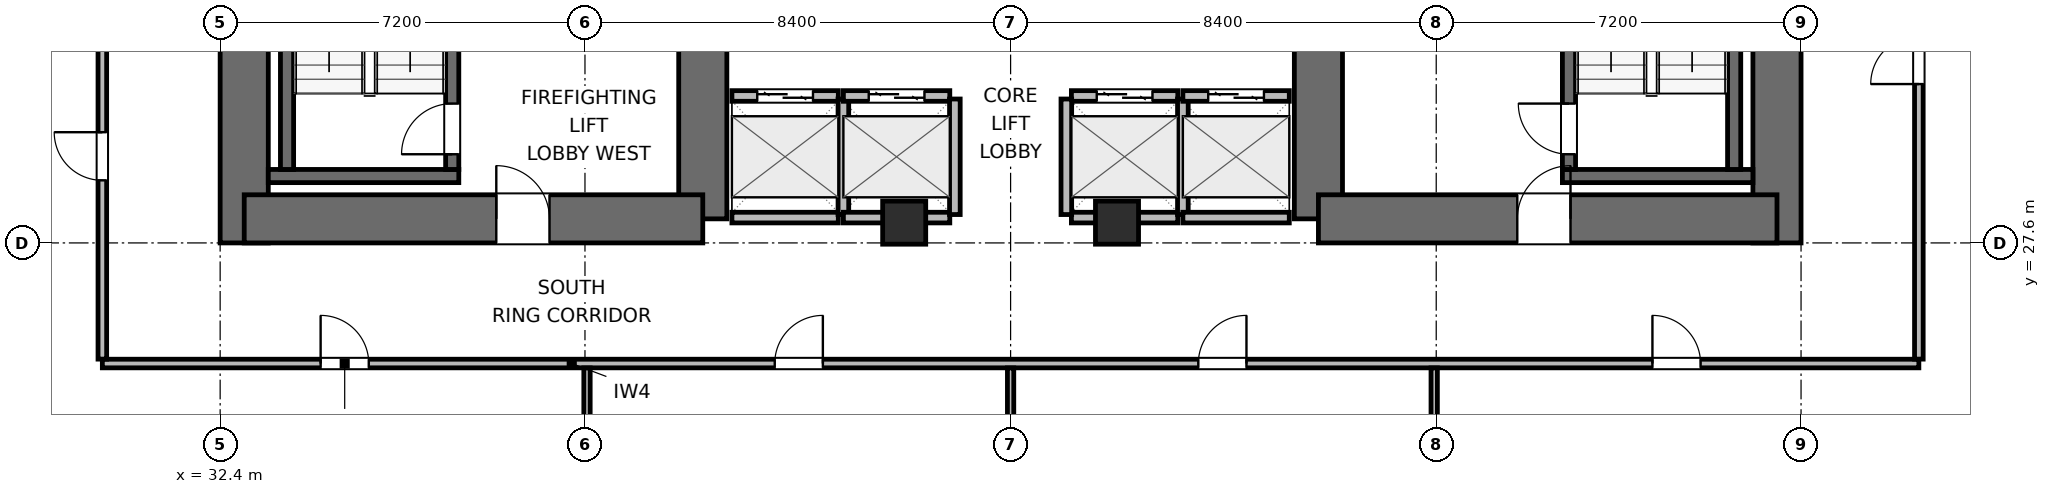
"""IFC4 building model, lengths in metres.
Left out: names, types, materials, properties, quantities, classifications, styles, units other than length and angle.
Written with IfcOpenShell. Run it as: python <this file> out.ifc"""

import sys

from ifc_helpers import new_model, si_unit, direction, frame, frame_2d, origin, origin_2d, place, context, subcontext, project, spatial, rectangle, extrude, element, fill, save


model = new_model("IFC4")
c1 = context("Model", 3, precision=1e-05, world=origin(), true_north=direction((0.0, 1.0)))
c2 = subcontext(c1, "Body", "Model", "MODEL_VIEW")
j1 = project(units=[si_unit("LENGTHUNIT", "METRE"), si_unit("PLANEANGLEUNIT", "RADIAN")], contexts=[c1])
p1 = place(None, origin())
s1 = spatial("IfcSite", under=j1, at=p1, CompositionType="ELEMENT")
p2 = place(p1, origin())
s2 = spatial("IfcBuilding", under=s1, at=p2, CompositionType="ELEMENT")
p3 = place(p2, frame((0.0, 0.0, 37.2)))
s3 = spatial("IfcBuildingStorey", under=s2, at=p3, CompositionType="ELEMENT", Elevation=37.2)
p4 = place(p3, frame((32.875, 27.6, 0.0), z_axis=(0.0, 0.0, 1.0), x_axis=(0.0, 1.0, 0.0)))
e1 = element("IfcWall", 1, at=p4, inside=s3, PredefinedType="SHEAR", context=c2, shape_type="SweptSolid", body=[
    extrude(rectangle(XDim=16.8, YDim=0.95, at=frame_2d((8.4, 0.0))), origin(), (0.0, 0.0, 1.0), 3.9),
])
p5 = place(p3, frame((41.925, 28.075, 0.0), z_axis=(0.0, 0.0, 1.0), x_axis=(0.0, 1.0, 0.0)))
e2 = element("IfcWall", 2, at=p5, inside=s3, PredefinedType="SHEAR", context=c2, shape_type="SweptSolid", body=[
    extrude(rectangle(XDim=6.325, YDim=0.95, at=frame_2d((3.163, 0.0))), origin(), (0.0, 0.0, 1.0), 3.9),
])
p6 = place(p3, frame((32.875, 28.075, 0.0), z_axis=(0.0, 0.0, 1.0), x_axis=(1.0, 0.0, 0.0)))
e3 = element("IfcWall", 3, at=p6, inside=s3, PredefinedType="SHEAR", context=c2, shape_type="SweptSolid", body=[
    extrude(rectangle(XDim=9.05, YDim=0.95, at=frame_2d((4.525, 0.0))), origin(), (0.0, 0.0, 1.0), 3.9),
])
p7 = place(p6, frame((4.975, 0.0, 0.0)))
e4 = element("IfcOpeningElement", 4, at=p7, cuts=e3, PredefinedType="OPENING", context=c2, shape_type="SweptSolid", body=[
    extrude(rectangle(XDim=1.05, YDim=2.04, at=frame_2d((0.525, 1.02))), frame((0.0, 0.485, 0.0), z_axis=(0.0, -1.0, 0.0), x_axis=(1.0, 0.0, 0.0)), (0.0, 0.0, 1.0), 0.97),
])
p8 = place(p3, frame((54.075, 28.075, 0.0), z_axis=(0.0, 0.0, 1.0), x_axis=(0.0, 1.0, 0.0)))
e5 = element("IfcWall", 5, at=p8, inside=s3, PredefinedType="SHEAR", context=c2, shape_type="SweptSolid", body=[
    extrude(rectangle(XDim=7.725, YDim=0.95, at=frame_2d((3.863, 0.0))), origin(), (0.0, 0.0, 1.0), 3.9),
])
p9 = place(p3, frame((63.125, 27.6, 0.0), z_axis=(0.0, 0.0, 1.0), x_axis=(0.0, 1.0, 0.0)))
e6 = element("IfcWall", 6, at=p9, inside=s3, PredefinedType="SHEAR", context=c2, shape_type="SweptSolid", body=[
    extrude(rectangle(XDim=16.8, YDim=0.95, at=frame_2d((8.4, 0.0))), origin(), (0.0, 0.0, 1.0), 3.9),
])
p10 = place(p3, frame((54.075, 28.075, 0.0), z_axis=(0.0, 0.0, 1.0), x_axis=(1.0, 0.0, 0.0)))
e7 = element("IfcWall", 7, at=p10, inside=s3, PredefinedType="SHEAR", context=c2, shape_type="SweptSolid", body=[
    extrude(rectangle(XDim=9.05, YDim=0.95, at=frame_2d((4.525, 0.0))), origin(), (0.0, 0.0, 1.0), 3.9),
])
p11 = place(p10, frame((3.925, 0.0, 0.0)))
e8 = element("IfcOpeningElement", 8, at=p11, cuts=e7, PredefinedType="OPENING", context=c2, shape_type="SweptSolid", body=[
    extrude(rectangle(XDim=1.05, YDim=2.04, at=frame_2d((0.525, 1.02))), frame((0.0, 0.485, 0.0), z_axis=(0.0, -1.0, 0.0), x_axis=(1.0, 0.0, 0.0)), (0.0, 0.0, 1.0), 0.97),
])
p12 = place(p3, frame((33.35, 28.92, 0.0), z_axis=(0.0, 0.0, 1.0), x_axis=(1.0, 0.0, 0.0)))
e9 = element("IfcWall", 9, at=p12, inside=s3, PredefinedType="SHEAR", context=c2, shape_type="SweptSolid", body=[
    extrude(rectangle(XDim=3.76, YDim=0.26, at=frame_2d((1.88, 0.0))), origin(), (0.0, 0.0, 1.0), 3.9),
])
p13 = place(p3, frame((33.72, 29.05, 0.0), z_axis=(0.0, 0.0, 1.0), x_axis=(0.0, 1.0, 0.0)))
e10 = element("IfcWall", 10, at=p13, inside=s3, PredefinedType="SHEAR", context=c2, shape_type="SweptSolid", body=[
    extrude(rectangle(XDim=7.6, YDim=0.26, at=frame_2d((3.8, 0.0))), origin(), (0.0, 0.0, 1.0), 3.9),
])
p14 = place(p3, frame((36.98, 29.05, 0.0), z_axis=(0.0, 0.0, 1.0), x_axis=(0.0, 1.0, 0.0)))
e11 = element("IfcWall", 11, at=p14, inside=s3, PredefinedType="SHEAR", context=c2, shape_type="SweptSolid", body=[
    extrude(rectangle(XDim=7.6, YDim=0.26, at=frame_2d((3.8, 0.0))), origin(), (0.0, 0.0, 1.0), 3.9),
])
p15 = place(p14, frame((0.3, 0.0, 0.0)))
e12 = element("IfcOpeningElement", 12, at=p15, cuts=e11, PredefinedType="OPENING", context=c2, shape_type="SweptSolid", body=[
    extrude(rectangle(XDim=1.0, YDim=2.04, at=frame_2d((0.5, 1.02))), frame((0.0, 0.14, 0.0), z_axis=(0.0, -1.0, 0.0), x_axis=(1.0, 0.0, 0.0)), (0.0, 0.0, 1.0), 0.28),
])
p16 = place(p3, frame((58.89, 28.92, 0.0), z_axis=(0.0, 0.0, 1.0), x_axis=(1.0, 0.0, 0.0)))
e13 = element("IfcWall", 13, at=p16, inside=s3, PredefinedType="SHEAR", context=c2, shape_type="SweptSolid", body=[
    extrude(rectangle(XDim=3.76, YDim=0.26, at=frame_2d((1.88, 0.0))), origin(), (0.0, 0.0, 1.0), 3.9),
])
p17 = place(p3, frame((59.02, 29.05, 0.0), z_axis=(0.0, 0.0, 1.0), x_axis=(0.0, 1.0, 0.0)))
e14 = element("IfcWall", 14, at=p17, inside=s3, PredefinedType="SHEAR", context=c2, shape_type="SweptSolid", body=[
    extrude(rectangle(XDim=7.6, YDim=0.26, at=frame_2d((3.8, 0.0))), origin(), (0.0, 0.0, 1.0), 3.9),
])
p18 = place(p17, frame((0.3, 0.0, 0.0)))
e15 = element("IfcOpeningElement", 15, at=p18, cuts=e14, PredefinedType="OPENING", context=c2, shape_type="SweptSolid", body=[
    extrude(rectangle(XDim=1.0, YDim=2.04, at=frame_2d((0.5, 1.02))), frame((0.0, 0.14, 0.0), z_axis=(0.0, -1.0, 0.0), x_axis=(1.0, 0.0, 0.0)), (0.0, 0.0, 1.0), 0.28),
])
p19 = place(p3, frame((62.28, 29.05, 0.0), z_axis=(0.0, 0.0, 1.0), x_axis=(0.0, 1.0, 0.0)))
e16 = element("IfcWall", 16, at=p19, inside=s3, PredefinedType="SHEAR", context=c2, shape_type="SweptSolid", body=[
    extrude(rectangle(XDim=7.6, YDim=0.26, at=frame_2d((3.8, 0.0))), origin(), (0.0, 0.0, 1.0), 3.9),
])
for number, where, z_axis, x_axis in (
    (17, (45.9, 28.0, 0.0), (0.0, 0.0, 1.0), (1.0, 0.0, 0.0)),
    (18, (50.1, 28.0, 0.0), (0.0, 0.0, 1.0), (1.0, 0.0, 0.0)),
):
    element("IfcColumn", number, at=place(p3, frame(where, z_axis=z_axis, x_axis=x_axis)), inside=s3, PredefinedType="COLUMN", context=c2, shape_type="SweptSolid", body=[
        extrude(rectangle(XDim=0.85, YDim=0.85, at=origin_2d()), origin(), (0.0, 0.0, 1.0), 3.9),
    ])
p20 = place(p3, frame((42.5, 30.5, 0.0), z_axis=(0.0, 0.0, 1.0), x_axis=(1.0, 0.0, 0.0)))
e19 = element("IfcWall", 19, at=p20, inside=s3, PredefinedType="PARTITIONING", context=c2, shape_type="SweptSolid", body=[
    extrude(rectangle(XDim=2.1, YDim=0.21, at=frame_2d((1.05, 0.0))), origin(), (0.0, 0.0, 1.0), 3.64),
])
p21 = place(p20, frame((0.5, 0.0, 0.0)))
e20 = element("IfcOpeningElement", 20, at=p21, cuts=e19, PredefinedType="OPENING", context=c2, shape_type="SweptSolid", body=[
    extrude(rectangle(XDim=1.1, YDim=2.04, at=frame_2d((0.55, 1.02))), frame((0.0, 0.115, 0.0), z_axis=(0.0, -1.0, 0.0), x_axis=(1.0, 0.0, 0.0)), (0.0, 0.0, 1.0), 0.23),
])
p22 = place(p3, frame((42.5, 28.1, 0.0), z_axis=(0.0, 0.0, 1.0), x_axis=(1.0, 0.0, 0.0)))
e21 = element("IfcWall", 21, at=p22, inside=s3, PredefinedType="PARTITIONING", context=c2, shape_type="SweptSolid", body=[
    extrude(rectangle(XDim=2.1, YDim=0.21, at=frame_2d((1.05, 0.0))), origin(), (0.0, 0.0, 1.0), 2.525),
])
p23 = place(p3, frame((44.7, 28.16, 0.0), z_axis=(0.0, 0.0, 1.0), x_axis=(0.0, 1.0, 0.0)))
e22 = element("IfcWall", 22, at=p23, inside=s3, PredefinedType="PARTITIONING", context=c2, shape_type="SweptSolid", body=[
    extrude(rectangle(XDim=2.28, YDim=0.21, at=frame_2d((1.14, 0.0))), origin(), (0.0, 0.0, 1.0), 3.64),
])
p24 = place(p3, frame((44.7, 30.5, 0.0), z_axis=(0.0, 0.0, 1.0), x_axis=(1.0, 0.0, 0.0)))
e23 = element("IfcWall", 23, at=p24, inside=s3, PredefinedType="PARTITIONING", context=c2, shape_type="SweptSolid", body=[
    extrude(rectangle(XDim=2.1, YDim=0.21, at=frame_2d((1.05, 0.0))), origin(), (0.0, 0.0, 1.0), 3.64),
])
p25 = place(p24, frame((0.5, 0.0, 0.0)))
e24 = element("IfcOpeningElement", 24, at=p25, cuts=e23, PredefinedType="OPENING", context=c2, shape_type="SweptSolid", body=[
    extrude(rectangle(XDim=1.1, YDim=2.04, at=frame_2d((0.55, 1.02))), frame((0.0, 0.115, 0.0), z_axis=(0.0, -1.0, 0.0), x_axis=(1.0, 0.0, 0.0)), (0.0, 0.0, 1.0), 0.23),
])
p26 = place(p3, frame((44.7, 28.1, 0.0), z_axis=(0.0, 0.0, 1.0), x_axis=(1.0, 0.0, 0.0)))
e25 = element("IfcWall", 25, at=p26, inside=s3, PredefinedType="PARTITIONING", context=c2, shape_type="SweptSolid", body=[
    extrude(rectangle(XDim=2.1, YDim=0.21, at=frame_2d((1.05, 0.0))), origin(), (0.0, 0.0, 1.0), 2.525),
])
p27 = place(p3, frame((46.9, 28.16, 0.0), z_axis=(0.0, 0.0, 1.0), x_axis=(0.0, 1.0, 0.0)))
e26 = element("IfcWall", 26, at=p27, inside=s3, PredefinedType="PARTITIONING", context=c2, shape_type="SweptSolid", body=[
    extrude(rectangle(XDim=2.28, YDim=0.21, at=frame_2d((1.14, 0.0))), origin(), (0.0, 0.0, 1.0), 3.64),
])
p28 = place(p3, frame((49.2, 30.5, 0.0), z_axis=(0.0, 0.0, 1.0), x_axis=(1.0, 0.0, 0.0)))
e27 = element("IfcWall", 27, at=p28, inside=s3, PredefinedType="PARTITIONING", context=c2, shape_type="SweptSolid", body=[
    extrude(rectangle(XDim=2.1, YDim=0.21, at=frame_2d((1.05, 0.0))), origin(), (0.0, 0.0, 1.0), 3.64),
])
p29 = place(p28, frame((0.5, 0.0, 0.0)))
e28 = element("IfcOpeningElement", 28, at=p29, cuts=e27, PredefinedType="OPENING", context=c2, shape_type="SweptSolid", body=[
    extrude(rectangle(XDim=1.1, YDim=2.04, at=frame_2d((0.55, 1.02))), frame((0.0, 0.115, 0.0), z_axis=(0.0, -1.0, 0.0), x_axis=(1.0, 0.0, 0.0)), (0.0, 0.0, 1.0), 0.23),
])
p30 = place(p3, frame((49.2, 28.1, 0.0), z_axis=(0.0, 0.0, 1.0), x_axis=(1.0, 0.0, 0.0)))
e29 = element("IfcWall", 29, at=p30, inside=s3, PredefinedType="PARTITIONING", context=c2, shape_type="SweptSolid", body=[
    extrude(rectangle(XDim=2.1, YDim=0.21, at=frame_2d((1.05, 0.0))), origin(), (0.0, 0.0, 1.0), 2.525),
])
for number, where, z_axis, x_axis in (
    (30, (49.1, 28.16, 0.0), (0.0, 0.0, 1.0), (0.0, 1.0, 0.0)),
    (31, (51.4, 28.16, 0.0), (0.0, 0.0, 1.0), (0.0, 1.0, 0.0)),
):
    element("IfcWall", number, at=place(p3, frame(where, z_axis=z_axis, x_axis=x_axis)), inside=s3, PredefinedType="PARTITIONING", context=c2, shape_type="SweptSolid", body=[
        extrude(rectangle(XDim=2.28, YDim=0.21, at=frame_2d((1.14, 0.0))), origin(), (0.0, 0.0, 1.0), 3.64),
    ])
p31 = place(p3, frame((51.4, 30.5, 0.0), z_axis=(0.0, 0.0, 1.0), x_axis=(1.0, 0.0, 0.0)))
e32 = element("IfcWall", 32, at=p31, inside=s3, PredefinedType="PARTITIONING", context=c2, shape_type="SweptSolid", body=[
    extrude(rectangle(XDim=2.1, YDim=0.21, at=frame_2d((1.05, 0.0))), origin(), (0.0, 0.0, 1.0), 3.64),
])
p32 = place(p31, frame((0.5, 0.0, 0.0)))
e33 = element("IfcOpeningElement", 33, at=p32, cuts=e32, PredefinedType="OPENING", context=c2, shape_type="SweptSolid", body=[
    extrude(rectangle(XDim=1.1, YDim=2.04, at=frame_2d((0.55, 1.02))), frame((0.0, 0.115, 0.0), z_axis=(0.0, -1.0, 0.0), x_axis=(1.0, 0.0, 0.0)), (0.0, 0.0, 1.0), 0.23),
])
p33 = place(p3, frame((51.4, 28.1, 0.0), z_axis=(0.0, 0.0, 1.0), x_axis=(1.0, 0.0, 0.0)))
e34 = element("IfcWall", 34, at=p33, inside=s3, PredefinedType="PARTITIONING", context=c2, shape_type="SweptSolid", body=[
    extrude(rectangle(XDim=2.1, YDim=0.21, at=frame_2d((1.05, 0.0))), origin(), (0.0, 0.0, 1.0), 2.525),
])
p34 = place(p3, frame((30.075, 25.22, 0.0), z_axis=(0.0, 0.0, 1.0), x_axis=(1.0, 0.0, 0.0)))
e35 = element("IfcWall", 35, at=p34, inside=s3, PredefinedType="PARTITIONING", context=c2, shape_type="SweptSolid", body=[
    extrude(rectangle(XDim=35.85, YDim=0.17, at=frame_2d((17.925, 0.0))), origin(), (0.0, 0.0, 1.0), 3.64),
])
p35 = place(p34, frame((4.308, 0.0, 0.0)))
e36 = element("IfcOpeningElement", 36, at=p35, cuts=e35, PredefinedType="OPENING", context=c2, shape_type="SweptSolid", body=[
    extrude(rectangle(XDim=0.95, YDim=2.04, at=frame_2d((0.475, 1.02))), frame((0.0, 0.095, 0.0), z_axis=(0.0, -1.0, 0.0), x_axis=(1.0, 0.0, 0.0)), (0.0, 0.0, 1.0), 0.19),
])
p36 = place(p34, frame((13.27, 0.0, 0.0)))
e37 = element("IfcOpeningElement", 37, at=p36, cuts=e35, PredefinedType="OPENING", context=c2, shape_type="SweptSolid", body=[
    extrude(rectangle(XDim=0.95, YDim=2.04, at=frame_2d((0.475, 1.02))), frame((0.0, 0.095, 0.0), z_axis=(0.0, -1.0, 0.0), x_axis=(1.0, 0.0, 0.0)), (0.0, 0.0, 1.0), 0.19),
])
p37 = place(p34, frame((21.63, 0.0, 0.0)))
e38 = element("IfcOpeningElement", 38, at=p37, cuts=e35, PredefinedType="OPENING", context=c2, shape_type="SweptSolid", body=[
    extrude(rectangle(XDim=0.95, YDim=2.04, at=frame_2d((0.475, 1.02))), frame((0.0, 0.095, 0.0), z_axis=(0.0, -1.0, 0.0), x_axis=(1.0, 0.0, 0.0)), (0.0, 0.0, 1.0), 0.19),
])
p38 = place(p34, frame((30.592, 0.0, 0.0)))
e39 = element("IfcOpeningElement", 39, at=p38, cuts=e35, PredefinedType="OPENING", context=c2, shape_type="SweptSolid", body=[
    extrude(rectangle(XDim=0.95, YDim=2.04, at=frame_2d((0.475, 1.02))), frame((0.0, 0.095, 0.0), z_axis=(0.0, -1.0, 0.0), x_axis=(1.0, 0.0, 0.0)), (0.0, 0.0, 1.0), 0.19),
])
p39 = place(p3, frame((30.075, 25.307, 0.0), z_axis=(0.0, 0.0, 1.0), x_axis=(0.0, 1.0, 0.0)))
e40 = element("IfcWall", 40, at=p39, inside=s3, PredefinedType="PARTITIONING", context=c2, shape_type="SweptSolid", body=[
    extrude(rectangle(XDim=21.386, YDim=0.17, at=frame_2d((10.693, 0.0))), origin(), (0.0, 0.0, 1.0), 3.64),
])
p40 = place(p39, frame((3.528, 0.0, 0.0)))
e41 = element("IfcOpeningElement", 41, at=p40, cuts=e40, PredefinedType="OPENING", context=c2, shape_type="SweptSolid", body=[
    extrude(rectangle(XDim=0.95, YDim=2.04, at=frame_2d((0.475, 1.02))), frame((0.0, 0.095, 0.0), z_axis=(0.0, -1.0, 0.0), x_axis=(1.0, 0.0, 0.0)), (0.0, 0.0, 1.0), 0.19),
])
p41 = place(p39, frame((10.818, 0.0, 0.0)))
e42 = element("IfcOpeningElement", 42, at=p41, cuts=e40, PredefinedType="OPENING", context=c2, shape_type="SweptSolid", body=[
    extrude(rectangle(XDim=0.95, YDim=2.04, at=frame_2d((0.475, 1.02))), frame((0.0, 0.095, 0.0), z_axis=(0.0, -1.0, 0.0), x_axis=(1.0, 0.0, 0.0)), (0.0, 0.0, 1.0), 0.19),
])
p42 = place(p39, frame((17.508, 0.0, 0.0)))
e43 = element("IfcOpeningElement", 43, at=p42, cuts=e40, PredefinedType="OPENING", context=c2, shape_type="SweptSolid", body=[
    extrude(rectangle(XDim=0.95, YDim=2.04, at=frame_2d((0.475, 1.02))), frame((0.0, 0.095, 0.0), z_axis=(0.0, -1.0, 0.0), x_axis=(1.0, 0.0, 0.0)), (0.0, 0.0, 1.0), 0.19),
])
p43 = place(p3, frame((65.925, 25.307, 0.0), z_axis=(0.0, 0.0, 1.0), x_axis=(0.0, 1.0, 0.0)))
e44 = element("IfcWall", 44, at=p43, inside=s3, PredefinedType="PARTITIONING", context=c2, shape_type="SweptSolid", body=[
    extrude(rectangle(XDim=21.386, YDim=0.17, at=frame_2d((10.693, 0.0))), origin(), (0.0, 0.0, 1.0), 3.64),
])
p44 = place(p43, frame((5.428, 0.0, 0.0)))
e45 = element("IfcOpeningElement", 45, at=p44, cuts=e44, PredefinedType="OPENING", context=c2, shape_type="SweptSolid", body=[
    extrude(rectangle(XDim=0.95, YDim=2.04, at=frame_2d((0.475, 1.02))), frame((0.0, 0.095, 0.0), z_axis=(0.0, -1.0, 0.0), x_axis=(1.0, 0.0, 0.0)), (0.0, 0.0, 1.0), 0.19),
])
p45 = place(p43, frame((16.208, 0.0, 0.0)))
e46 = element("IfcOpeningElement", 46, at=p45, cuts=e44, PredefinedType="OPENING", context=c2, shape_type="SweptSolid", body=[
    extrude(rectangle(XDim=0.95, YDim=2.04, at=frame_2d((0.475, 1.02))), frame((0.0, 0.095, 0.0), z_axis=(0.0, -1.0, 0.0), x_axis=(1.0, 0.0, 0.0)), (0.0, 0.0, 1.0), 0.19),
])
p46 = place(p3, frame((39.64, 9.915, 0.0), z_axis=(0.0, 0.0, 1.0), x_axis=(0.0, 1.0, 0.0)))
e47 = element("IfcWall", 47, at=p46, inside=s3, PredefinedType="PARTITIONING", context=c2, shape_type="SweptSolid", body=[
    extrude(rectangle(XDim=15.218, YDim=0.125, at=frame_2d((7.609, 0.0))), origin(), (0.0, 0.0, 1.0), 2.93),
])
p47 = place(p3, frame((48.0, 11.515, 0.0), z_axis=(0.0, 0.0, 1.0), x_axis=(0.0, 1.0, 0.0)))
e48 = element("IfcWall", 48, at=p47, inside=s3, PredefinedType="PARTITIONING", context=c2, shape_type="SweptSolid", body=[
    extrude(rectangle(XDim=13.618, YDim=0.125, at=frame_2d((6.809, 0.0))), origin(), (0.0, 0.0, 1.0), 2.93),
])
p48 = place(p3, frame((56.36, 9.915, 0.0), z_axis=(0.0, 0.0, 1.0), x_axis=(0.0, 1.0, 0.0)))
e49 = element("IfcWall", 49, at=p48, inside=s3, PredefinedType="PARTITIONING", context=c2, shape_type="SweptSolid", body=[
    extrude(rectangle(XDim=15.218, YDim=0.125, at=frame_2d((7.609, 0.0))), origin(), (0.0, 0.0, 1.0), 2.93),
])
p49 = place(p15, origin())
e50 = element("IfcDoor", 50, at=p49, inside=s3, OperationType="SINGLE_SWING_LEFT", PredefinedType="DOOR", context=c2, shape_type="SweptSolid", body=[
    extrude(rectangle(XDim=1.0, YDim=2.04, at=frame_2d((0.5, 1.02))), frame((0.0, 0.025, 0.0), z_axis=(0.0, -1.0, 0.0), x_axis=(1.0, 0.0, 0.0)), (0.0, 0.0, 1.0), 0.05),
])
fill(e12, e50)
p50 = place(p18, origin())
e51 = element("IfcDoor", 51, at=p50, inside=s3, OperationType="SINGLE_SWING_RIGHT", PredefinedType="DOOR", context=c2, shape_type="SweptSolid", body=[
    extrude(rectangle(XDim=1.0, YDim=2.04, at=frame_2d((0.5, 1.02))), frame((0.0, 0.025, 0.0), z_axis=(0.0, -1.0, 0.0), x_axis=(1.0, 0.0, 0.0)), (0.0, 0.0, 1.0), 0.05),
])
fill(e15, e51)
p51 = place(p21, origin())
e52 = element("IfcDoor", 52, at=p51, inside=s3, OperationType="DOUBLE_DOOR_SLIDING", PredefinedType="DOOR", context=c2, shape_type="SweptSolid", body=[
    extrude(rectangle(XDim=1.1, YDim=2.04, at=frame_2d((0.55, 1.02))), frame((0.0, 0.025, 0.0), z_axis=(0.0, -1.0, 0.0), x_axis=(1.0, 0.0, 0.0)), (0.0, 0.0, 1.0), 0.05),
])
fill(e20, e52)
p52 = place(p25, origin())
e53 = element("IfcDoor", 53, at=p52, inside=s3, OperationType="DOUBLE_DOOR_SLIDING", PredefinedType="DOOR", context=c2, shape_type="SweptSolid", body=[
    extrude(rectangle(XDim=1.1, YDim=2.04, at=frame_2d((0.55, 1.02))), frame((0.0, 0.025, 0.0), z_axis=(0.0, -1.0, 0.0), x_axis=(1.0, 0.0, 0.0)), (0.0, 0.0, 1.0), 0.05),
])
fill(e24, e53)
p53 = place(p29, origin())
e54 = element("IfcDoor", 54, at=p53, inside=s3, OperationType="DOUBLE_DOOR_SLIDING", PredefinedType="DOOR", context=c2, shape_type="SweptSolid", body=[
    extrude(rectangle(XDim=1.1, YDim=2.04, at=frame_2d((0.55, 1.02))), frame((0.0, 0.025, 0.0), z_axis=(0.0, -1.0, 0.0), x_axis=(1.0, 0.0, 0.0)), (0.0, 0.0, 1.0), 0.05),
])
fill(e28, e54)
p54 = place(p32, origin())
e55 = element("IfcDoor", 55, at=p54, inside=s3, OperationType="DOUBLE_DOOR_SLIDING", PredefinedType="DOOR", context=c2, shape_type="SweptSolid", body=[
    extrude(rectangle(XDim=1.1, YDim=2.04, at=frame_2d((0.55, 1.02))), frame((0.0, 0.025, 0.0), z_axis=(0.0, -1.0, 0.0), x_axis=(1.0, 0.0, 0.0)), (0.0, 0.0, 1.0), 0.05),
])
fill(e33, e55)
p55 = place(p7, origin())
e56 = element("IfcDoor", 56, at=p55, inside=s3, OperationType="SINGLE_SWING_LEFT", PredefinedType="DOOR", context=c2, shape_type="SweptSolid", body=[
    extrude(rectangle(XDim=1.05, YDim=2.04, at=frame_2d((0.525, 1.02))), frame((0.0, 0.025, 0.0), z_axis=(0.0, -1.0, 0.0), x_axis=(1.0, 0.0, 0.0)), (0.0, 0.0, 1.0), 0.05),
])
fill(e4, e56)
p56 = place(p11, origin())
e57 = element("IfcDoor", 57, at=p56, inside=s3, OperationType="SINGLE_SWING_RIGHT", PredefinedType="DOOR", context=c2, shape_type="SweptSolid", body=[
    extrude(rectangle(XDim=1.05, YDim=2.04, at=frame_2d((0.525, 1.02))), frame((0.0, 0.025, 0.0), z_axis=(0.0, -1.0, 0.0), x_axis=(1.0, 0.0, 0.0)), (0.0, 0.0, 1.0), 0.05),
])
fill(e8, e57)
p57 = place(p35, origin())
e58 = element("IfcDoor", 58, at=p57, inside=s3, OperationType="SINGLE_SWING_LEFT", PredefinedType="DOOR", context=c2, shape_type="SweptSolid", body=[
    extrude(rectangle(XDim=0.95, YDim=2.04, at=frame_2d((0.475, 1.02))), frame((0.0, 0.025, 0.0), z_axis=(0.0, -1.0, 0.0), x_axis=(1.0, 0.0, 0.0)), (0.0, 0.0, 1.0), 0.05),
])
fill(e36, e58)
p58 = place(p36, origin())
e59 = element("IfcDoor", 59, at=p58, inside=s3, OperationType="SINGLE_SWING_RIGHT", PredefinedType="DOOR", context=c2, shape_type="SweptSolid", body=[
    extrude(rectangle(XDim=0.95, YDim=2.04, at=frame_2d((0.475, 1.02))), frame((0.0, 0.025, 0.0), z_axis=(0.0, -1.0, 0.0), x_axis=(1.0, 0.0, 0.0)), (0.0, 0.0, 1.0), 0.05),
])
fill(e37, e59)
p59 = place(p37, origin())
e60 = element("IfcDoor", 60, at=p59, inside=s3, OperationType="SINGLE_SWING_RIGHT", PredefinedType="DOOR", context=c2, shape_type="SweptSolid", body=[
    extrude(rectangle(XDim=0.95, YDim=2.04, at=frame_2d((0.475, 1.02))), frame((0.0, 0.025, 0.0), z_axis=(0.0, -1.0, 0.0), x_axis=(1.0, 0.0, 0.0)), (0.0, 0.0, 1.0), 0.05),
])
fill(e38, e60)
p60 = place(p38, origin())
e61 = element("IfcDoor", 61, at=p60, inside=s3, OperationType="SINGLE_SWING_LEFT", PredefinedType="DOOR", context=c2, shape_type="SweptSolid", body=[
    extrude(rectangle(XDim=0.95, YDim=2.04, at=frame_2d((0.475, 1.02))), frame((0.0, 0.025, 0.0), z_axis=(0.0, -1.0, 0.0), x_axis=(1.0, 0.0, 0.0)), (0.0, 0.0, 1.0), 0.05),
])
fill(e39, e61)
p61 = place(p40, origin())
e62 = element("IfcDoor", 62, at=p61, inside=s3, OperationType="SINGLE_SWING_RIGHT", PredefinedType="DOOR", context=c2, shape_type="SweptSolid", body=[
    extrude(rectangle(XDim=0.95, YDim=2.04, at=frame_2d((0.475, 1.02))), frame((0.0, 0.025, 0.0), z_axis=(0.0, -1.0, 0.0), x_axis=(1.0, 0.0, 0.0)), (0.0, 0.0, 1.0), 0.05),
])
fill(e41, e62)
p62 = place(p44, origin())
e63 = element("IfcDoor", 63, at=p62, inside=s3, OperationType="SINGLE_SWING_LEFT", PredefinedType="DOOR", context=c2, shape_type="SweptSolid", body=[
    extrude(rectangle(XDim=0.95, YDim=2.04, at=frame_2d((0.475, 1.02))), frame((0.0, 0.025, 0.0), z_axis=(0.0, -1.0, 0.0), x_axis=(1.0, 0.0, 0.0)), (0.0, 0.0, 1.0), 0.05),
])
fill(e45, e63)
save(model, sys.argv[1])
